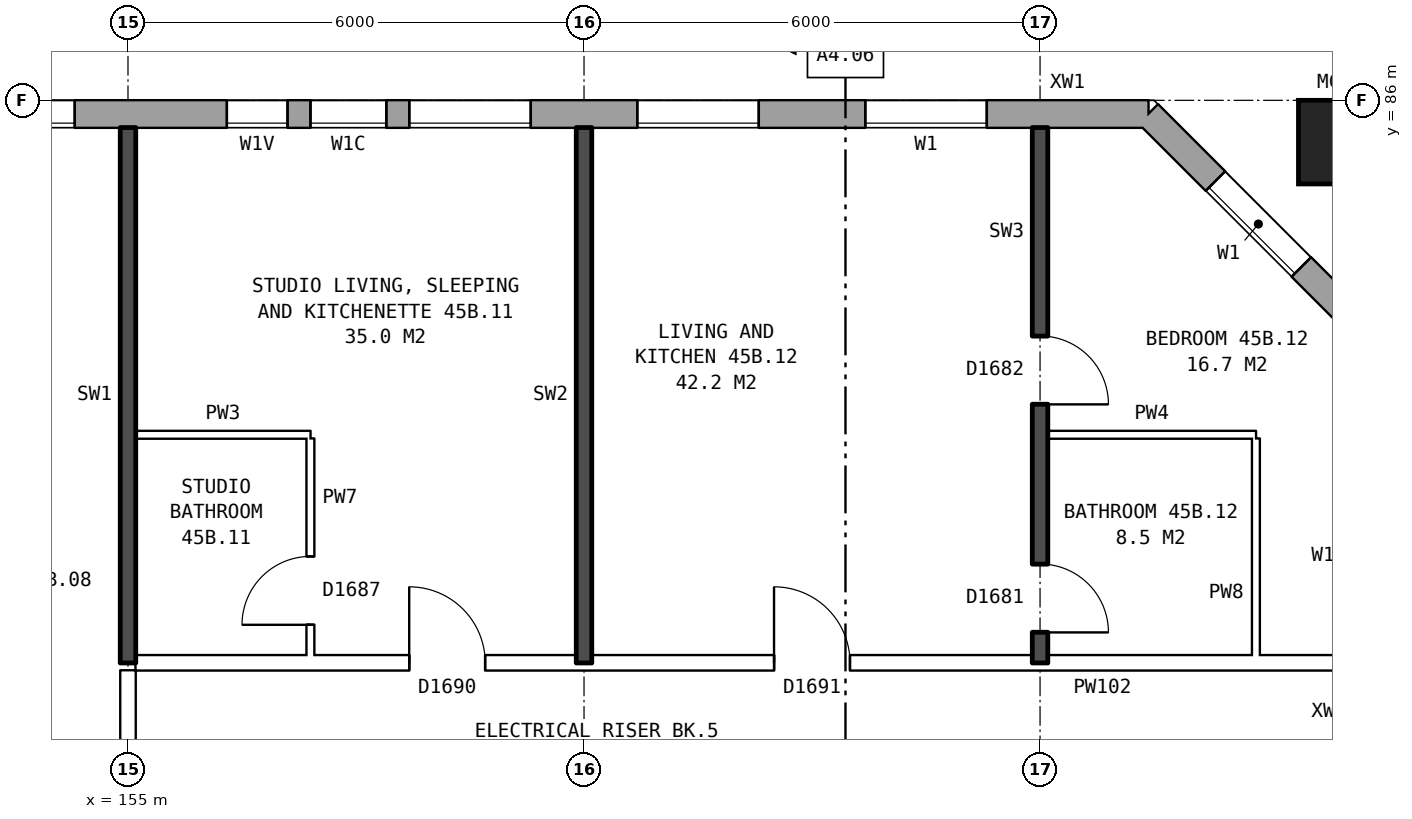
"""IFC4 building model, lengths in metres.
Left out: names, types, materials, properties, quantities, classifications, styles, units other than length and angle.
Written with IfcOpenShell. Run it as: python <this file> out.ifc"""

import sys

from ifc_helpers import new_model, si_unit, direction, frame, frame_2d, origin, origin_2d, place, context, subcontext, project, spatial, rectangle, hollow_rectangle, extrude, element, fill, save


model = new_model("IFC4")
c1 = context("Model", 3, precision=1e-05, world=origin(), true_north=direction((0.0, 1.0)))
c2 = subcontext(c1, "Body", "Model", "MODEL_VIEW")
j1 = project(units=[si_unit("LENGTHUNIT", "METRE"), si_unit("PLANEANGLEUNIT", "RADIAN")], contexts=[c1])
p1 = place(None, origin())
s1 = spatial("IfcSite", under=j1, at=p1, CompositionType="ELEMENT")
p2 = place(p1, origin())
s2 = spatial("IfcBuilding", under=s1, at=p2, CompositionType="ELEMENT")
p3 = place(p2, frame((0.0, 0.0, 160.9)))
s3 = spatial("IfcBuildingStorey", under=s2, at=p3, CompositionType="ELEMENT", Elevation=160.9)
p4 = place(p3, frame((170.95, 85.45, 0.0), z_axis=(0.0, 0.0, 1.0), x_axis=(1.0, 0.0, 0.0)))
e1 = element("IfcColumn", 1, at=p4, inside=s3, PredefinedType="COLUMN", context=c2, shape_type="SweptSolid", body=[
    extrude(hollow_rectangle(XDim=1.1, YDim=1.1, WallThickness=0.06, at=origin_2d()), origin(), (0.0, 0.0, 1.0), 3.1),
])
p5 = place(p3, frame((171.32, 82.925, 0.0), z_axis=(0.0, 0.0, 1.0), x_axis=(-0.707106781187, 0.707106781187, 0.0)))
e2 = element("IfcWall", 2, at=p5, inside=s3, PredefinedType="STANDARD", context=c2, shape_type="SweptSolid", body=[
    extrude(rectangle(XDim=4.094, YDim=0.36, at=frame_2d((2.047, 0.0))), origin(), (0.0, 0.0, 1.0), 2.85),
])
p6 = place(p5, frame((1.247, 0.0, 0.8)))
e3 = element("IfcOpeningElement", 3, at=p6, cuts=e2, PredefinedType="OPENING", context=c2, shape_type="SweptSolid", body=[
    extrude(rectangle(XDim=1.6, YDim=1.8, at=frame_2d((0.8, 0.9))), frame((0.0, 0.19, 0.0), z_axis=(0.0, -1.0, 0.0), x_axis=(1.0, 0.0, 0.0)), (0.0, 0.0, 1.0), 0.38),
])
p7 = place(p3, frame((168.425, 85.82, 0.0), z_axis=(0.0, 0.0, 1.0), x_axis=(-1.0, 0.0, 0.0)))
e4 = element("IfcWall", 4, at=p7, inside=s3, PredefinedType="STANDARD", context=c2, shape_type="SweptSolid", body=[
    extrude(rectangle(XDim=34.351, YDim=0.36, at=frame_2d((17.175, 0.0))), origin(), (0.0, 0.0, 1.0), 2.85),
])
p8 = place(p7, frame((2.125, 0.0, 0.8)))
e5 = element("IfcOpeningElement", 5, at=p8, cuts=e4, PredefinedType="OPENING", context=c2, shape_type="SweptSolid", body=[
    extrude(rectangle(XDim=1.6, YDim=1.8, at=frame_2d((0.8, 0.9))), frame((0.0, 0.19, 0.0), z_axis=(0.0, -1.0, 0.0), x_axis=(1.0, 0.0, 0.0)), (0.0, 0.0, 1.0), 0.38),
])
p9 = place(p7, frame((5.125, 0.0, 0.8)))
e6 = element("IfcOpeningElement", 6, at=p9, cuts=e4, PredefinedType="OPENING", context=c2, shape_type="SweptSolid", body=[
    extrude(rectangle(XDim=1.6, YDim=1.8, at=frame_2d((0.8, 0.9))), frame((0.0, 0.19, 0.0), z_axis=(0.0, -1.0, 0.0), x_axis=(1.0, 0.0, 0.0)), (0.0, 0.0, 1.0), 0.38),
])
p10 = place(p7, frame((8.125, 0.0, 0.8)))
e7 = element("IfcOpeningElement", 7, at=p10, cuts=e4, PredefinedType="OPENING", context=c2, shape_type="SweptSolid", body=[
    extrude(rectangle(XDim=1.6, YDim=1.8, at=frame_2d((0.8, 0.9))), frame((0.0, 0.19, 0.0), z_axis=(0.0, -1.0, 0.0), x_axis=(1.0, 0.0, 0.0)), (0.0, 0.0, 1.0), 0.38),
])
p11 = place(p7, frame((10.025, 0.0, 0.8)))
e8 = element("IfcOpeningElement", 8, at=p11, cuts=e4, PredefinedType="OPENING", context=c2, shape_type="SweptSolid", body=[
    extrude(rectangle(XDim=1.0, YDim=1.8, at=frame_2d((0.5, 0.9))), frame((0.0, 0.19, 0.0), z_axis=(0.0, -1.0, 0.0), x_axis=(1.0, 0.0, 0.0)), (0.0, 0.0, 1.0), 0.38),
])
p12 = place(p7, frame((14.125, 0.0, 0.8)))
e9 = element("IfcOpeningElement", 9, at=p12, cuts=e4, PredefinedType="OPENING", context=c2, shape_type="SweptSolid", body=[
    extrude(rectangle(XDim=1.6, YDim=1.8, at=frame_2d((0.8, 0.9))), frame((0.0, 0.19, 0.0), z_axis=(0.0, -1.0, 0.0), x_axis=(1.0, 0.0, 0.0)), (0.0, 0.0, 1.0), 0.38),
])
p13 = place(p7, frame((17.125, 0.0, 0.8)))
e10 = element("IfcOpeningElement", 10, at=p13, cuts=e4, PredefinedType="OPENING", context=c2, shape_type="SweptSolid", body=[
    extrude(rectangle(XDim=1.6, YDim=1.8, at=frame_2d((0.8, 0.9))), frame((0.0, 0.19, 0.0), z_axis=(0.0, -1.0, 0.0), x_axis=(1.0, 0.0, 0.0)), (0.0, 0.0, 1.0), 0.38),
])
p14 = place(p7, frame((19.625, 0.0, 0.65)))
e11 = element("IfcOpeningElement", 11, at=p14, cuts=e4, PredefinedType="OPENING", context=c2, shape_type="SweptSolid", body=[
    extrude(rectangle(XDim=0.6, YDim=1.8, at=frame_2d((0.3, 0.9))), frame((0.0, 0.19, 0.0), z_axis=(0.0, -1.0, 0.0), x_axis=(1.0, 0.0, 0.0)), (0.0, 0.0, 1.0), 0.38),
])
p15 = place(p7, frame((23.125, 0.0, 0.8)))
e12 = element("IfcOpeningElement", 12, at=p15, cuts=e4, PredefinedType="OPENING", context=c2, shape_type="SweptSolid", body=[
    extrude(rectangle(XDim=1.6, YDim=1.8, at=frame_2d((0.8, 0.9))), frame((0.0, 0.19, 0.0), z_axis=(0.0, -1.0, 0.0), x_axis=(1.0, 0.0, 0.0)), (0.0, 0.0, 1.0), 0.38),
])
p16 = place(p7, frame((26.125, 0.0, 0.8)))
e13 = element("IfcOpeningElement", 13, at=p16, cuts=e4, PredefinedType="OPENING", context=c2, shape_type="SweptSolid", body=[
    extrude(rectangle(XDim=1.6, YDim=1.8, at=frame_2d((0.8, 0.9))), frame((0.0, 0.19, 0.0), z_axis=(0.0, -1.0, 0.0), x_axis=(1.0, 0.0, 0.0)), (0.0, 0.0, 1.0), 0.38),
])
p17 = place(p7, frame((29.125, 0.0, 0.8)))
e14 = element("IfcOpeningElement", 14, at=p17, cuts=e4, PredefinedType="OPENING", context=c2, shape_type="SweptSolid", body=[
    extrude(rectangle(XDim=1.6, YDim=1.8, at=frame_2d((0.8, 0.9))), frame((0.0, 0.19, 0.0), z_axis=(0.0, -1.0, 0.0), x_axis=(1.0, 0.0, 0.0)), (0.0, 0.0, 1.0), 0.38),
])
p18 = place(p7, frame((32.125, 0.0, 0.8)))
e15 = element("IfcOpeningElement", 15, at=p18, cuts=e4, PredefinedType="OPENING", context=c2, shape_type="SweptSolid", body=[
    extrude(rectangle(XDim=1.6, YDim=1.8, at=frame_2d((0.8, 0.9))), frame((0.0, 0.19, 0.0), z_axis=(0.0, -1.0, 0.0), x_axis=(1.0, 0.0, 0.0)), (0.0, 0.0, 1.0), 0.38),
])
p19 = place(p7, frame((11.325, 0.0, 1.7)))
e16 = element("IfcOpeningElement", 16, at=p19, cuts=e4, PredefinedType="OPENING", context=c2, shape_type="SweptSolid", body=[
    extrude(rectangle(XDim=0.8, YDim=0.9, at=frame_2d((0.4, 0.45))), frame((0.0, 0.19, 0.0), z_axis=(0.0, -1.0, 0.0), x_axis=(1.0, 0.0, 0.0)), (0.0, 0.0, 1.0), 0.38),
])
p20 = place(p7, frame((20.525, 0.0, 0.55)))
e17 = element("IfcOpeningElement", 17, at=p20, cuts=e4, PredefinedType="OPENING", context=c2, shape_type="SweptSolid", body=[
    extrude(rectangle(XDim=0.8, YDim=0.9, at=frame_2d((0.4, 0.45))), frame((0.0, 0.19, 0.0), z_axis=(0.0, -1.0, 0.0), x_axis=(1.0, 0.0, 0.0)), (0.0, 0.0, 1.0), 0.38),
])
p21 = place(p3, frame((155.1, 78.6, 0.0), z_axis=(0.0, 0.0, 1.0), x_axis=(1.0, 0.0, 0.0)))
e18 = element("IfcWall", 18, at=p21, inside=s3, PredefinedType="PARTITIONING", context=c2, shape_type="SweptSolid", body=[
    extrude(rectangle(XDim=16.04, YDim=0.2, at=frame_2d((8.02, 0.0))), origin(), (0.0, 0.0, 1.0), 2.85),
])
p22 = place(p21, frame((3.6, 0.0, 0.0)))
e19 = element("IfcOpeningElement", 19, at=p22, cuts=e18, PredefinedType="OPENING", context=c2, shape_type="SweptSolid", body=[
    extrude(rectangle(XDim=1.0, YDim=2.1, at=frame_2d((0.5, 1.05))), frame((0.0, 0.11, 0.0), z_axis=(0.0, -1.0, 0.0), x_axis=(1.0, 0.0, 0.0)), (0.0, 0.0, 1.0), 0.22),
])
p23 = place(p21, frame((8.4, 0.0, 0.0)))
e20 = element("IfcOpeningElement", 20, at=p23, cuts=e18, PredefinedType="OPENING", context=c2, shape_type="SweptSolid", body=[
    extrude(rectangle(XDim=1.0, YDim=2.1, at=frame_2d((0.5, 1.05))), frame((0.0, 0.11, 0.0), z_axis=(0.0, -1.0, 0.0), x_axis=(1.0, 0.0, 0.0)), (0.0, 0.0, 1.0), 0.22),
])
p24 = place(p3, frame((155.1, 81.6, 0.0), z_axis=(0.0, 0.0, 1.0), x_axis=(1.0, 0.0, 0.0)))
e21 = element("IfcWall", 21, at=p24, inside=s3, PredefinedType="PARTITIONING", context=c2, shape_type="SweptSolid", body=[
    extrude(rectangle(XDim=2.3, YDim=0.1, at=frame_2d((1.15, 0.0))), origin(), (0.0, 0.0, 1.0), 2.85),
])
p25 = place(p3, frame((167.1, 81.6, 0.0), z_axis=(0.0, 0.0, 1.0), x_axis=(1.0, 0.0, 0.0)))
e22 = element("IfcWall", 22, at=p25, inside=s3, PredefinedType="PARTITIONING", context=c2, shape_type="SweptSolid", body=[
    extrude(rectangle(XDim=2.74, YDim=0.1, at=frame_2d((1.37, 0.0))), origin(), (0.0, 0.0, 1.0), 2.85),
])
p26 = place(p3, frame((155.0, 76.3, 0.0), z_axis=(0.0, 0.0, 1.0), x_axis=(0.0, 1.0, 0.0)))
e23 = element("IfcWall", 23, at=p26, inside=s3, PredefinedType="PARTITIONING", context=c2, shape_type="SweptSolid", body=[
    extrude(rectangle(XDim=2.2, YDim=0.2, at=frame_2d((1.1, 0.0))), origin(), (0.0, 0.0, 1.0), 2.85),
])
p27 = place(p3, frame((155.0, 78.6, 0.0), z_axis=(0.0, 0.0, 1.0), x_axis=(0.0, 1.0, 0.0)))
e24 = element("IfcWall", 24, at=p27, inside=s3, PredefinedType="SOLIDWALL", context=c2, shape_type="SweptSolid", body=[
    extrude(rectangle(XDim=7.04, YDim=0.2, at=frame_2d((3.52, 0.0))), origin(), (0.0, 0.0, 1.0), 2.85),
])
p28 = place(p3, frame((157.4, 78.7, 0.0), z_axis=(0.0, 0.0, 1.0), x_axis=(0.0, 1.0, 0.0)))
e25 = element("IfcWall", 25, at=p28, inside=s3, PredefinedType="PARTITIONING", context=c2, shape_type="SweptSolid", body=[
    extrude(rectangle(XDim=2.85, YDim=0.1, at=frame_2d((1.425, 0.0))), origin(), (0.0, 0.0, 1.0), 2.85),
])
p29 = place(p28, frame((0.4, 0.0, 0.0)))
e26 = element("IfcOpeningElement", 26, at=p29, cuts=e25, PredefinedType="OPENING", context=c2, shape_type="SweptSolid", body=[
    extrude(rectangle(XDim=0.9, YDim=2.1, at=frame_2d((0.45, 1.05))), frame((0.0, 0.06, 0.0), z_axis=(0.0, -1.0, 0.0), x_axis=(1.0, 0.0, 0.0)), (0.0, 0.0, 1.0), 0.12),
])
p30 = place(p3, frame((161.0, 78.6, 0.0), z_axis=(0.0, 0.0, 1.0), x_axis=(0.0, 1.0, 0.0)))
e27 = element("IfcWall", 27, at=p30, inside=s3, PredefinedType="SOLIDWALL", context=c2, shape_type="SweptSolid", body=[
    extrude(rectangle(XDim=7.04, YDim=0.2, at=frame_2d((3.52, 0.0))), origin(), (0.0, 0.0, 1.0), 2.85),
])
p31 = place(p3, frame((167.0, 78.6, 0.0), z_axis=(0.0, 0.0, 1.0), x_axis=(0.0, 1.0, 0.0)))
e28 = element("IfcWall", 28, at=p31, inside=s3, PredefinedType="SOLIDWALL", context=c2, shape_type="SweptSolid", body=[
    extrude(rectangle(XDim=7.04, YDim=0.2, at=frame_2d((3.52, 0.0))), origin(), (0.0, 0.0, 1.0), 2.85),
])
p32 = place(p31, frame((3.4, 0.0, 0.0)))
e29 = element("IfcOpeningElement", 29, at=p32, cuts=e28, PredefinedType="OPENING", context=c2, shape_type="SweptSolid", body=[
    extrude(rectangle(XDim=0.9, YDim=2.1, at=frame_2d((0.45, 1.05))), frame((0.0, 0.11, 0.0), z_axis=(0.0, -1.0, 0.0), x_axis=(1.0, 0.0, 0.0)), (0.0, 0.0, 1.0), 0.22),
])
p33 = place(p31, frame((0.4, 0.0, 0.0)))
e30 = element("IfcOpeningElement", 30, at=p33, cuts=e28, PredefinedType="OPENING", context=c2, shape_type="SweptSolid", body=[
    extrude(rectangle(XDim=0.9, YDim=2.1, at=frame_2d((0.45, 1.05))), frame((0.0, 0.11, 0.0), z_axis=(0.0, -1.0, 0.0), x_axis=(1.0, 0.0, 0.0)), (0.0, 0.0, 1.0), 0.22),
])
p34 = place(p3, frame((169.84, 78.7, 0.0), z_axis=(0.0, 0.0, 1.0), x_axis=(0.0, 1.0, 0.0)))
e31 = element("IfcWall", 31, at=p34, inside=s3, PredefinedType="PARTITIONING", context=c2, shape_type="SweptSolid", body=[
    extrude(rectangle(XDim=2.85, YDim=0.1, at=frame_2d((1.425, 0.0))), origin(), (0.0, 0.0, 1.0), 2.85),
])
p35 = place(p6, origin())
e32 = element("IfcWindow", 32, at=p35, inside=s3, PartitioningType="SINGLE_PANEL", PredefinedType="WINDOW", context=c2, shape_type="SweptSolid", body=[
    extrude(rectangle(XDim=1.6, YDim=1.8, at=frame_2d((0.8, 0.9))), frame((0.0, 0.15, 0.0), z_axis=(0.0, -1.0, 0.0), x_axis=(1.0, 0.0, 0.0)), (0.0, 0.0, 1.0), 0.06),
])
fill(e3, e32)
p36 = place(p8, origin())
e33 = element("IfcWindow", 33, at=p36, inside=s3, PartitioningType="SINGLE_PANEL", PredefinedType="WINDOW", context=c2, shape_type="SweptSolid", body=[
    extrude(rectangle(XDim=1.6, YDim=1.8, at=frame_2d((0.8, 0.9))), frame((0.0, 0.15, 0.0), z_axis=(0.0, -1.0, 0.0), x_axis=(1.0, 0.0, 0.0)), (0.0, 0.0, 1.0), 0.06),
])
fill(e5, e33)
p37 = place(p9, origin())
e34 = element("IfcWindow", 34, at=p37, inside=s3, PartitioningType="SINGLE_PANEL", PredefinedType="WINDOW", context=c2, shape_type="SweptSolid", body=[
    extrude(rectangle(XDim=1.6, YDim=1.8, at=frame_2d((0.8, 0.9))), frame((0.0, 0.15, 0.0), z_axis=(0.0, -1.0, 0.0), x_axis=(1.0, 0.0, 0.0)), (0.0, 0.0, 1.0), 0.06),
])
fill(e6, e34)
p38 = place(p10, origin())
e35 = element("IfcWindow", 35, at=p38, inside=s3, PartitioningType="SINGLE_PANEL", PredefinedType="WINDOW", context=c2, shape_type="SweptSolid", body=[
    extrude(rectangle(XDim=1.6, YDim=1.8, at=frame_2d((0.8, 0.9))), frame((0.0, 0.15, 0.0), z_axis=(0.0, -1.0, 0.0), x_axis=(1.0, 0.0, 0.0)), (0.0, 0.0, 1.0), 0.06),
])
fill(e7, e35)
p39 = place(p11, origin())
e36 = element("IfcWindow", 36, at=p39, inside=s3, PartitioningType="SINGLE_PANEL", PredefinedType="WINDOW", context=c2, shape_type="SweptSolid", body=[
    extrude(rectangle(XDim=1.0, YDim=1.8, at=frame_2d((0.5, 0.9))), frame((0.0, 0.15, 0.0), z_axis=(0.0, -1.0, 0.0), x_axis=(1.0, 0.0, 0.0)), (0.0, 0.0, 1.0), 0.06),
])
fill(e8, e36)
p40 = place(p12, origin())
e37 = element("IfcWindow", 37, at=p40, inside=s3, PartitioningType="SINGLE_PANEL", PredefinedType="WINDOW", context=c2, shape_type="SweptSolid", body=[
    extrude(rectangle(XDim=1.6, YDim=1.8, at=frame_2d((0.8, 0.9))), frame((0.0, 0.15, 0.0), z_axis=(0.0, -1.0, 0.0), x_axis=(1.0, 0.0, 0.0)), (0.0, 0.0, 1.0), 0.06),
])
fill(e9, e37)
p41 = place(p22, origin())
e38 = element("IfcDoor", 38, at=p41, inside=s3, OperationType="SINGLE_SWING_LEFT", PredefinedType="DOOR", context=c2, shape_type="SweptSolid", body=[
    extrude(rectangle(XDim=1.0, YDim=2.1, at=frame_2d((0.5, 1.05))), frame((0.0, 0.025, 0.0), z_axis=(0.0, -1.0, 0.0), x_axis=(1.0, 0.0, 0.0)), (0.0, 0.0, 1.0), 0.05),
])
fill(e19, e38)
p42 = place(p29, origin())
e39 = element("IfcDoor", 39, at=p42, inside=s3, OperationType="SINGLE_SWING_LEFT", PredefinedType="DOOR", context=c2, shape_type="SweptSolid", body=[
    extrude(rectangle(XDim=0.9, YDim=2.1, at=frame_2d((0.45, 1.05))), frame((0.0, 0.025, 0.0), z_axis=(0.0, -1.0, 0.0), x_axis=(1.0, 0.0, 0.0)), (0.0, 0.0, 1.0), 0.05),
])
fill(e26, e39)
p43 = place(p32, frame((0.9, 0.0, 0.0), z_axis=(0.0, 0.0, 1.0), x_axis=(-1.0, 0.0, 0.0)))
e40 = element("IfcDoor", 40, at=p43, inside=s3, OperationType="SINGLE_SWING_RIGHT", PredefinedType="DOOR", context=c2, shape_type="SweptSolid", body=[
    extrude(rectangle(XDim=0.9, YDim=2.1, at=frame_2d((0.45, 1.05))), frame((0.0, 0.025, 0.0), z_axis=(0.0, -1.0, 0.0), x_axis=(1.0, 0.0, 0.0)), (0.0, 0.0, 1.0), 0.05),
])
fill(e29, e40)
p44 = place(p23, origin())
e41 = element("IfcDoor", 41, at=p44, inside=s3, OperationType="SINGLE_SWING_LEFT", PredefinedType="DOOR", context=c2, shape_type="SweptSolid", body=[
    extrude(rectangle(XDim=1.0, YDim=2.1, at=frame_2d((0.5, 1.05))), frame((0.0, 0.025, 0.0), z_axis=(0.0, -1.0, 0.0), x_axis=(1.0, 0.0, 0.0)), (0.0, 0.0, 1.0), 0.05),
])
fill(e20, e41)
p45 = place(p33, frame((0.9, 0.0, 0.0), z_axis=(0.0, 0.0, 1.0), x_axis=(-1.0, 0.0, 0.0)))
e42 = element("IfcDoor", 42, at=p45, inside=s3, OperationType="SINGLE_SWING_RIGHT", PredefinedType="DOOR", context=c2, shape_type="SweptSolid", body=[
    extrude(rectangle(XDim=0.9, YDim=2.1, at=frame_2d((0.45, 1.05))), frame((0.0, 0.025, 0.0), z_axis=(0.0, -1.0, 0.0), x_axis=(1.0, 0.0, 0.0)), (0.0, 0.0, 1.0), 0.05),
])
fill(e30, e42)
p46 = place(p19, origin())
e43 = element("IfcWindow", 43, at=p46, inside=s3, PartitioningType="SINGLE_PANEL", PredefinedType="WINDOW", context=c2, shape_type="SweptSolid", body=[
    extrude(rectangle(XDim=0.8, YDim=0.9, at=frame_2d((0.4, 0.45))), frame((0.0, 0.15, 0.0), z_axis=(0.0, -1.0, 0.0), x_axis=(1.0, 0.0, 0.0)), (0.0, 0.0, 1.0), 0.06),
])
fill(e16, e43)
save(model, sys.argv[1])
